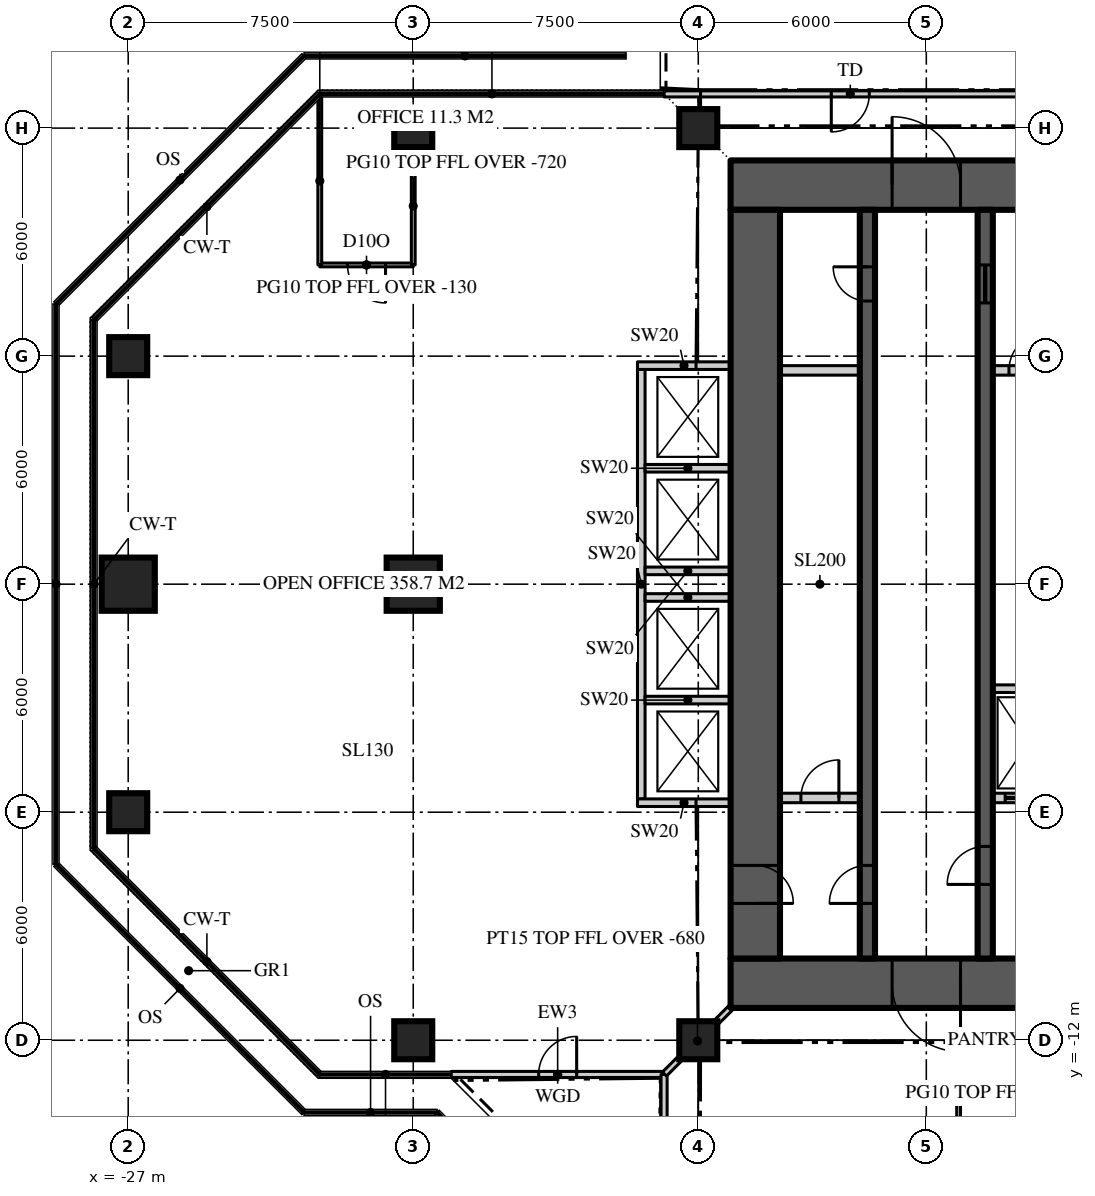
"""IFC4 building model, lengths in metres.
Left out: names, types, materials, properties, quantities, classifications, styles, units other than length and angle.
Written with IfcOpenShell. Run it as: python <this file> out.ifc"""

import sys

from ifc_helpers import new_model, si_unit, direction, frame, frame_2d, origin, origin_2d, place, context, subcontext, project, spatial, rectangle, extrude, element, fill, save


model = new_model("IFC4")
c1 = context("Model", 3, precision=1e-05, world=origin(), true_north=direction((0.0, 1.0)))
c2 = subcontext(c1, "Body", "Model", "MODEL_VIEW")
j1 = project(units=[si_unit("LENGTHUNIT", "METRE"), si_unit("PLANEANGLEUNIT", "RADIAN")], contexts=[c1])
p1 = place(None, origin())
s1 = spatial("IfcSite", under=j1, at=p1, CompositionType="ELEMENT")
p2 = place(p1, origin())
s2 = spatial("IfcBuilding", under=s1, at=p2, CompositionType="ELEMENT")
p3 = place(p2, frame((0.0, 0.0, 267.3)))
s3 = spatial("IfcBuildingStorey", under=s2, at=p3, CompositionType="ELEMENT", Elevation=267.3)
p4 = place(p3, frame((-11.15, 10.5, 0.0), z_axis=(0.0, 0.0, 1.0), x_axis=(1.0, 0.0, 0.0)))
e1 = element("IfcWall", 1, at=p4, inside=s3, PredefinedType="SHEAR", context=c2, shape_type="SweptSolid", body=[
    extrude(rectangle(XDim=22.3, YDim=1.3, at=frame_2d((11.15, 0.0))), origin(), (0.0, 0.0, 1.0), 3.9),
])
p5 = place(p4, frame((4.25, 0.0, 0.0)))
e2 = element("IfcOpeningElement", 2, at=p5, cuts=e1, PredefinedType="OPENING", context=c2, shape_type="SweptSolid", body=[
    extrude(rectangle(XDim=1.8, YDim=2.2, at=frame_2d((0.9, 1.1))), frame((0.0, 0.66, 0.0), z_axis=(0.0, -1.0, 0.0), x_axis=(1.0, 0.0, 0.0)), (0.0, 0.0, 1.0), 1.32),
])
p6 = place(p4, frame((16.25, 0.0, 0.0)))
e3 = element("IfcOpeningElement", 3, at=p6, cuts=e1, PredefinedType="OPENING", context=c2, shape_type="SweptSolid", body=[
    extrude(rectangle(XDim=1.8, YDim=2.2, at=frame_2d((0.9, 1.1))), frame((0.0, 0.66, 0.0), z_axis=(0.0, -1.0, 0.0), x_axis=(1.0, 0.0, 0.0)), (0.0, 0.0, 1.0), 1.32),
])
p7 = place(p3, frame((11.15, -10.5, 0.0), z_axis=(0.0, 0.0, 1.0), x_axis=(-1.0, 0.0, 0.0)))
e4 = element("IfcWall", 4, at=p7, inside=s3, PredefinedType="SHEAR", context=c2, shape_type="SweptSolid", body=[
    extrude(rectangle(XDim=22.3, YDim=1.3, at=frame_2d((11.15, 0.0))), origin(), (0.0, 0.0, 1.0), 3.9),
])
p8 = place(p7, frame((16.25, 0.0, 0.0)))
e5 = element("IfcOpeningElement", 5, at=p8, cuts=e4, PredefinedType="OPENING", context=c2, shape_type="SweptSolid", body=[
    extrude(rectangle(XDim=1.8, YDim=2.2, at=frame_2d((0.9, 1.1))), frame((0.0, 0.66, 0.0), z_axis=(0.0, -1.0, 0.0), x_axis=(1.0, 0.0, 0.0)), (0.0, 0.0, 1.0), 1.32),
])
p9 = place(p7, frame((4.25, 0.0, 0.0)))
e6 = element("IfcOpeningElement", 6, at=p9, cuts=e4, PredefinedType="OPENING", context=c2, shape_type="SweptSolid", body=[
    extrude(rectangle(XDim=1.8, YDim=2.2, at=frame_2d((0.9, 1.1))), frame((0.0, 0.66, 0.0), z_axis=(0.0, -1.0, 0.0), x_axis=(1.0, 0.0, 0.0)), (0.0, 0.0, 1.0), 1.32),
])
p10 = place(p3, frame((-10.5, 9.85, 0.0), z_axis=(0.0, 0.0, 1.0), x_axis=(0.0, -1.0, 0.0)))
e7 = element("IfcWall", 7, at=p10, inside=s3, PredefinedType="SHEAR", context=c2, shape_type="SweptSolid", body=[
    extrude(rectangle(XDim=19.7, YDim=1.3, at=frame_2d((9.85, 0.0))), origin(), (0.0, 0.0, 1.0), 3.9),
])
p11 = place(p10, frame((17.25, 0.0, 0.0)))
e8 = element("IfcOpeningElement", 8, at=p11, cuts=e7, PredefinedType="OPENING", context=c2, shape_type="SweptSolid", body=[
    extrude(rectangle(XDim=1.0, YDim=2.2, at=frame_2d((0.5, 1.1))), frame((0.0, 0.66, 0.0), z_axis=(0.0, -1.0, 0.0), x_axis=(1.0, 0.0, 0.0)), (0.0, 0.0, 1.0), 1.32),
])
for number, where, z_axis, x_axis in (
    (9, (-19.5, -12.0, 0.0), (0.0, 0.0, 1.0), (1.0, 0.0, 0.0)),
    (10, (-12.0, -12.0, 0.0), (0.0, 0.0, 1.0), (1.0, 0.0, 0.0)),
    (11, (-27.0, -6.0, 0.0), (0.0, 0.0, 1.0), (1.0, 0.0, 0.0)),
):
    element("IfcColumn", number, at=place(p3, frame(where, z_axis=z_axis, x_axis=x_axis)), inside=s3, PredefinedType="COLUMN", context=c2, shape_type="SweptSolid", body=[
        extrude(rectangle(XDim=1.0, YDim=1.0, at=origin_2d()), origin(), (0.0, 0.0, 1.0), 3.9),
    ])
for number, where, z_axis, x_axis in (
    (12, (-27.0, 0.0, 0.0), (0.0, 0.0, 1.0), (1.0, 0.0, 0.0)),
    (13, (-19.5, 0.0, 0.0), (0.0, 0.0, 1.0), (1.0, 0.0, 0.0)),
):
    element("IfcColumn", number, at=place(p3, frame(where, z_axis=z_axis, x_axis=x_axis)), inside=s3, PredefinedType="COLUMN", context=c2, shape_type="SweptSolid", body=[
        extrude(rectangle(XDim=1.4, YDim=1.4, at=origin_2d()), origin(), (0.0, 0.0, 1.0), 3.9),
    ])
for number, where, z_axis, x_axis in (
    (14, (-27.0, 6.0, 0.0), (0.0, 0.0, 1.0), (1.0, 0.0, 0.0)),
    (15, (-19.5, 12.0, 0.0), (0.0, 0.0, 1.0), (1.0, 0.0, 0.0)),
    (16, (-12.0, 12.0, 0.0), (0.0, 0.0, 1.0), (1.0, 0.0, 0.0)),
):
    element("IfcColumn", number, at=place(p3, frame(where, z_axis=z_axis, x_axis=x_axis)), inside=s3, PredefinedType="COLUMN", context=c2, shape_type="SweptSolid", body=[
        extrude(rectangle(XDim=1.0, YDim=1.0, at=origin_2d()), origin(), (0.0, 0.0, 1.0), 3.9),
    ])
p12 = place(p3, frame((12.9, 12.9, 0.0), z_axis=(0.0, 0.0, 1.0), x_axis=(-1.0, 0.0, 0.0)))
e17 = element("IfcWall", 17, at=p12, inside=s3, PredefinedType="SOLIDWALL", context=c2, shape_type="SweptSolid", body=[
    extrude(rectangle(XDim=25.8, YDim=0.16, at=frame_2d((12.9, 0.0))), origin(), (0.0, 0.0, 1.0), 3.77),
])
p13 = place(p12, frame((4.4, 0.0, 0.0)))
e18 = element("IfcOpeningElement", 18, at=p13, cuts=e17, PredefinedType="OPENING", context=c2, shape_type="SweptSolid", body=[
    extrude(rectangle(XDim=1.0, YDim=2.2, at=frame_2d((0.5, 1.1))), frame((0.0, 0.09, 0.0), z_axis=(0.0, -1.0, 0.0), x_axis=(1.0, 0.0, 0.0)), (0.0, 0.0, 1.0), 0.18),
])
p14 = place(p12, frame((20.4, 0.0, 0.0)))
e19 = element("IfcOpeningElement", 19, at=p14, cuts=e17, PredefinedType="OPENING", context=c2, shape_type="SweptSolid", body=[
    extrude(rectangle(XDim=1.0, YDim=2.2, at=frame_2d((0.5, 1.1))), frame((0.0, 0.09, 0.0), z_axis=(0.0, -1.0, 0.0), x_axis=(1.0, 0.0, 0.0)), (0.0, 0.0, 1.0), 0.18),
])
p15 = place(p3, frame((-18.5, -12.9, 0.0), z_axis=(0.0, 0.0, 1.0), x_axis=(1.0, 0.0, 0.0)))
e20 = element("IfcWall", 20, at=p15, inside=s3, PredefinedType="SOLIDWALL", context=c2, shape_type="SweptSolid", body=[
    extrude(rectangle(XDim=5.6, YDim=0.16, at=frame_2d((2.8, 0.0))), origin(), (0.0, 0.0, 1.0), 3.77),
])
p16 = place(p15, frame((2.3, 0.0, 0.0)))
e21 = element("IfcOpeningElement", 21, at=p16, cuts=e20, PredefinedType="OPENING", context=c2, shape_type="SweptSolid", body=[
    extrude(rectangle(XDim=1.0, YDim=2.2, at=frame_2d((0.5, 1.1))), frame((0.0, 0.09, 0.0), z_axis=(0.0, -1.0, 0.0), x_axis=(1.0, 0.0, 0.0)), (0.0, 0.0, 1.0), 0.18),
])
p17 = place(p3, frame((-12.9, -12.9, 0.0), z_axis=(0.0, 0.0, 1.0), x_axis=(0.0, -1.0, 0.0)))
e22 = element("IfcWall", 22, at=p17, inside=s3, PredefinedType="SOLIDWALL", context=c2, shape_type="SweptSolid", body=[
    extrude(rectangle(XDim=5.6, YDim=0.16, at=frame_2d((2.8, 0.0))), origin(), (0.0, 0.0, 1.0), 3.77),
])
p18 = place(p3, frame((-7.55, -9.85, 0.0), z_axis=(0.0, 0.0, 1.0), x_axis=(0.0, 1.0, 0.0)))
e23 = element("IfcWall", 23, at=p18, inside=s3, PredefinedType="SHEAR", context=c2, shape_type="SweptSolid", body=[
    extrude(rectangle(XDim=19.7, YDim=0.4, at=frame_2d((9.85, 0.0))), origin(), (0.0, 0.0, 1.0), 3.9),
])
p19 = place(p18, frame((1.45, 0.0, 0.0)))
e24 = element("IfcOpeningElement", 24, at=p19, cuts=e23, PredefinedType="OPENING", context=c2, shape_type="SweptSolid", body=[
    extrude(rectangle(XDim=1.0, YDim=2.2, at=frame_2d((0.5, 1.1))), frame((0.0, 0.21, 0.0), z_axis=(0.0, -1.0, 0.0), x_axis=(1.0, 0.0, 0.0)), (0.0, 0.0, 1.0), 0.42),
])
p20 = place(p18, frame((17.3, 0.0, 0.0)))
e25 = element("IfcOpeningElement", 25, at=p20, cuts=e23, PredefinedType="OPENING", context=c2, shape_type="SweptSolid", body=[
    extrude(rectangle(XDim=0.9, YDim=2.1, at=frame_2d((0.45, 1.05))), frame((0.0, 0.21, 0.0), z_axis=(0.0, -1.0, 0.0), x_axis=(1.0, 0.0, 0.0)), (0.0, 0.0, 1.0), 0.42),
])
p21 = place(p3, frame((-4.45, -9.85, 0.0), z_axis=(0.0, 0.0, 1.0), x_axis=(0.0, 1.0, 0.0)))
e26 = element("IfcWall", 26, at=p21, inside=s3, PredefinedType="SHEAR", context=c2, shape_type="SweptSolid", body=[
    extrude(rectangle(XDim=19.7, YDim=0.4, at=frame_2d((9.85, 0.0))), origin(), (0.0, 0.0, 1.0), 3.9),
])
p22 = place(p21, frame((1.95, 0.0, 0.0)))
e27 = element("IfcOpeningElement", 27, at=p22, cuts=e26, PredefinedType="OPENING", context=c2, shape_type="SweptSolid", body=[
    extrude(rectangle(XDim=1.0, YDim=2.2, at=frame_2d((0.5, 1.1))), frame((0.0, 0.21, 0.0), z_axis=(0.0, -1.0, 0.0), x_axis=(1.0, 0.0, 0.0)), (0.0, 0.0, 1.0), 0.42),
])
p23 = place(p21, frame((17.25, 0.0, 0.0)))
e28 = element("IfcOpeningElement", 28, at=p23, cuts=e26, PredefinedType="OPENING", context=c2, shape_type="SweptSolid", body=[
    extrude(rectangle(XDim=1.0, YDim=2.1, at=frame_2d((0.5, 1.05))), frame((0.0, 0.21, 0.0), z_axis=(0.0, -1.0, 0.0), x_axis=(1.0, 0.0, 0.0)), (0.0, 0.0, 1.0), 0.42),
])
p24 = place(p3, frame((-9.85, 5.625, 0.0), z_axis=(0.0, 0.0, 1.0), x_axis=(1.0, 0.0, 0.0)))
e29 = element("IfcWall", 29, at=p24, inside=s3, PredefinedType="SOLIDWALL", context=c2, shape_type="SweptSolid", body=[
    extrude(rectangle(XDim=2.1, YDim=0.25, at=frame_2d((1.05, 0.0))), origin(), (0.0, 0.0, 1.0), 3.7),
])
p25 = place(p3, frame((-4.25, 5.625, 0.0), z_axis=(0.0, 0.0, 1.0), x_axis=(1.0, 0.0, 0.0)))
e30 = element("IfcWall", 30, at=p25, inside=s3, PredefinedType="SOLIDWALL", context=c2, shape_type="SweptSolid", body=[
    extrude(rectangle(XDim=1.85, YDim=0.25, at=frame_2d((0.925, 0.0))), origin(), (0.0, 0.0, 1.0), 3.7),
])
p26 = place(p25, frame((0.425, 0.0, 0.0)))
e31 = element("IfcOpeningElement", 31, at=p26, cuts=e30, PredefinedType="OPENING", context=c2, shape_type="SweptSolid", body=[
    extrude(rectangle(XDim=1.0, YDim=2.2, at=frame_2d((0.5, 1.1))), frame((0.0, 0.135, 0.0), z_axis=(0.0, -1.0, 0.0), x_axis=(1.0, 0.0, 0.0)), (0.0, 0.0, 1.0), 0.27),
])
p27 = place(p3, frame((-9.85, -5.625, 0.0), z_axis=(0.0, 0.0, 1.0), x_axis=(1.0, 0.0, 0.0)))
e32 = element("IfcWall", 32, at=p27, inside=s3, PredefinedType="SOLIDWALL", context=c2, shape_type="SweptSolid", body=[
    extrude(rectangle(XDim=2.1, YDim=0.25, at=frame_2d((1.05, 0.0))), origin(), (0.0, 0.0, 1.0), 3.7),
])
p28 = place(p27, frame((0.55, 0.0, 0.0)))
e33 = element("IfcOpeningElement", 33, at=p28, cuts=e32, PredefinedType="OPENING", context=c2, shape_type="SweptSolid", body=[
    extrude(rectangle(XDim=1.0, YDim=2.2, at=frame_2d((0.5, 1.1))), frame((0.0, 0.135, 0.0), z_axis=(0.0, -1.0, 0.0), x_axis=(1.0, 0.0, 0.0)), (0.0, 0.0, 1.0), 0.27),
])
p29 = place(p3, frame((-4.25, -5.625, 0.0), z_axis=(0.0, 0.0, 1.0), x_axis=(1.0, 0.0, 0.0)))
e34 = element("IfcWall", 34, at=p29, inside=s3, PredefinedType="SOLIDWALL", context=c2, shape_type="SweptSolid", body=[
    extrude(rectangle(XDim=1.85, YDim=0.25, at=frame_2d((0.925, 0.0))), origin(), (0.0, 0.0, 1.0), 3.7),
])
p30 = place(p29, frame((0.325, 0.0, 0.0)))
e35 = element("IfcOpeningElement", 35, at=p30, cuts=e34, PredefinedType="OPENING", context=c2, shape_type="SweptSolid", body=[
    extrude(rectangle(XDim=1.2, YDim=2.2, at=frame_2d((0.6, 1.1))), frame((0.0, 0.135, 0.0), z_axis=(0.0, -1.0, 0.0), x_axis=(1.0, 0.0, 0.0)), (0.0, 0.0, 1.0), 0.27),
])
p31 = place(p3, frame((-4.25, -2.75, 0.0), z_axis=(0.0, 0.0, 1.0), x_axis=(1.0, 0.0, 0.0)))
e36 = element("IfcWall", 36, at=p31, inside=s3, PredefinedType="SOLIDWALL", context=c2, shape_type="SweptSolid", body=[
    extrude(rectangle(XDim=1.85, YDim=0.2, at=frame_2d((0.925, 0.0))), origin(), (0.0, 0.0, 1.0), 3.7),
])
p32 = place(p3, frame((-19.5, 8.4, 0.0), z_axis=(0.0, 0.0, 1.0), x_axis=(-1.0, 0.0, 0.0)))
e37 = element("IfcWall", 37, at=p32, inside=s3, PredefinedType="PARTITIONING", context=c2, shape_type="SweptSolid", body=[
    extrude(rectangle(XDim=2.459, YDim=0.1, at=frame_2d((1.229, 0.0))), origin(), (0.0, 0.0, 1.0), 3.77),
])
p33 = place(p32, frame((0.729, 0.0, 0.0)))
e38 = element("IfcOpeningElement", 38, at=p33, cuts=e37, PredefinedType="OPENING", context=c2, shape_type="SweptSolid", body=[
    extrude(rectangle(XDim=1.0, YDim=2.2, at=frame_2d((0.5, 1.1))), frame((0.0, 0.06, 0.0), z_axis=(0.0, -1.0, 0.0), x_axis=(1.0, 0.0, 0.0)), (0.0, 0.0, 1.0), 0.12),
])
p34 = place(p3, frame((-19.5, 8.4, 0.0), z_axis=(0.0, 0.0, 1.0), x_axis=(0.0, 1.0, 0.0)))
e39 = element("IfcWall", 39, at=p34, inside=s3, PredefinedType="PARTITIONING", context=c2, shape_type="SweptSolid", body=[
    extrude(rectangle(XDim=3.1, YDim=0.1, at=frame_2d((1.55, 0.0))), origin(), (0.0, 0.0, 1.0), 3.18),
])
p35 = place(p3, frame((-21.959, 8.4, 0.0), z_axis=(0.0, 0.0, 1.0), x_axis=(0.0, 1.0, 0.0)))
e40 = element("IfcWall", 40, at=p35, inside=s3, PredefinedType="PARTITIONING", context=c2, shape_type="SweptSolid", body=[
    extrude(rectangle(XDim=4.42, YDim=0.1, at=frame_2d((2.21, 0.0))), origin(), (0.0, 0.0, 1.0), 3.77),
])
p36 = place(p3, frame((-2.15, -13.4, 0.0), z_axis=(0.0, 0.0, 1.0), x_axis=(-1.0, 0.0, 0.0)))
e41 = element("IfcWall", 41, at=p36, inside=s3, PredefinedType="PARTITIONING", context=c2, shape_type="SweptSolid", body=[
    extrude(rectangle(XDim=3.0, YDim=0.1, at=frame_2d((1.5, 0.0))), origin(), (0.0, 0.0, 1.0), 3.77),
])
p37 = place(p3, frame((-5.15, -13.35, 0.0), z_axis=(0.0, 0.0, 1.0), x_axis=(0.0, -1.0, 0.0)))
e42 = element("IfcWall", 42, at=p37, inside=s3, PredefinedType="PARTITIONING", context=c2, shape_type="SweptSolid", body=[
    extrude(rectangle(XDim=3.1, YDim=0.1, at=frame_2d((1.55, 0.0))), origin(), (0.0, 0.0, 1.0), 3.77),
])
p38 = place(p37, frame((1.05, 0.0, 0.0)))
e43 = element("IfcOpeningElement", 43, at=p38, cuts=e42, PredefinedType="OPENING", context=c2, shape_type="SweptSolid", body=[
    extrude(rectangle(XDim=1.0, YDim=2.2, at=frame_2d((0.5, 1.1))), frame((0.0, 0.06, 0.0), z_axis=(0.0, -1.0, 0.0), x_axis=(1.0, 0.0, 0.0)), (0.0, 0.0, 1.0), 0.12),
])
p39 = place(p3, frame((-13.5, 5.65, 0.0), z_axis=(0.0, 0.0, 1.0), x_axis=(0.0, -1.0, 0.0)))
e44 = element("IfcWall", 44, at=p39, inside=s3, PredefinedType="SOLIDWALL", context=c2, shape_type="SweptSolid", body=[
    extrude(rectangle(XDim=11.3, YDim=0.2, at=frame_2d((5.65, 0.0))), origin(), (0.0, 0.0, 1.0), 3.7),
])
for number, where, z_axis, x_axis in (
    (45, (-11.15, 5.75, 0.0), (0.0, 0.0, 1.0), (-1.0, 0.0, 0.0)),
    (46, (-11.15, -5.75, 0.0), (0.0, 0.0, 1.0), (-1.0, 0.0, 0.0)),
):
    element("IfcWall", number, at=place(p3, frame(where, z_axis=z_axis, x_axis=x_axis)), inside=s3, PredefinedType="SOLIDWALL", context=c2, shape_type="SweptSolid", body=[
        extrude(rectangle(XDim=2.45, YDim=0.2, at=frame_2d((1.225, 0.0))), origin(), (0.0, 0.0, 1.0), 3.7),
    ])
for number, where, z_axis, x_axis in (
    (47, (-11.15, 3.05, 0.0), (0.0, 0.0, 1.0), (-1.0, 0.0, 0.0)),
    (48, (-11.15, 0.35, 0.0), (0.0, 0.0, 1.0), (-1.0, 0.0, 0.0)),
    (49, (-11.15, -0.35, 0.0), (0.0, 0.0, 1.0), (-1.0, 0.0, 0.0)),
    (50, (-11.15, -3.05, 0.0), (0.0, 0.0, 1.0), (-1.0, 0.0, 0.0)),
):
    element("IfcWall", number, at=place(p3, frame(where, z_axis=z_axis, x_axis=x_axis)), inside=s3, PredefinedType="SOLIDWALL", context=c2, shape_type="SweptSolid", body=[
        extrude(rectangle(XDim=2.25, YDim=0.2, at=frame_2d((1.125, 0.0))), origin(), (0.0, 0.0, 1.0), 3.7),
    ])
p40 = place(p3, frame((-11.15, -11.15, 0.0), z_axis=(0.0, 0.0, 1.0), x_axis=(-0.707106781187, -0.707106781187, 0.0)))
e51 = element("IfcWall", 51, at=p40, inside=s3, PredefinedType="PARTITIONING", context=c2, shape_type="SweptSolid", body=[
    extrude(rectangle(XDim=2.461, YDim=0.15, at=frame_2d((1.23, 0.0))), origin(), (0.0, 0.0, 1.0), 3.22),
])
p41 = place(p14, origin())
e52 = element("IfcDoor", 52, at=p41, inside=s3, OperationType="SINGLE_SWING_RIGHT", PredefinedType="DOOR", context=c2, shape_type="SweptSolid", body=[
    extrude(rectangle(XDim=1.0, YDim=2.2, at=frame_2d((0.5, 1.1))), frame((0.0, 0.025, 0.0), z_axis=(0.0, -1.0, 0.0), x_axis=(1.0, 0.0, 0.0)), (0.0, 0.0, 1.0), 0.05),
])
fill(e19, e52)
p42 = place(p16, origin())
e53 = element("IfcDoor", 53, at=p42, inside=s3, OperationType="SINGLE_SWING_RIGHT", PredefinedType="DOOR", context=c2, shape_type="SweptSolid", body=[
    extrude(rectangle(XDim=1.0, YDim=2.2, at=frame_2d((0.5, 1.1))), frame((0.0, 0.025, 0.0), z_axis=(0.0, -1.0, 0.0), x_axis=(1.0, 0.0, 0.0)), (0.0, 0.0, 1.0), 0.05),
])
fill(e21, e53)
p43 = place(p5, origin())
e54 = element("IfcDoor", 54, at=p43, inside=s3, OperationType="DOUBLE_DOOR_DOUBLE_SWING", PredefinedType="DOOR", context=c2, shape_type="SweptSolid", body=[
    extrude(rectangle(XDim=1.8, YDim=2.2, at=frame_2d((0.9, 1.1))), frame((0.0, 0.025, 0.0), z_axis=(0.0, -1.0, 0.0), x_axis=(1.0, 0.0, 0.0)), (0.0, 0.0, 1.0), 0.05),
])
fill(e2, e54)
p44 = place(p8, origin())
e55 = element("IfcDoor", 55, at=p44, inside=s3, OperationType="DOUBLE_DOOR_DOUBLE_SWING", PredefinedType="DOOR", context=c2, shape_type="SweptSolid", body=[
    extrude(rectangle(XDim=1.8, YDim=2.2, at=frame_2d((0.9, 1.1))), frame((0.0, 0.025, 0.0), z_axis=(0.0, -1.0, 0.0), x_axis=(1.0, 0.0, 0.0)), (0.0, 0.0, 1.0), 0.05),
])
fill(e5, e55)
p45 = place(p19, origin())
e56 = element("IfcDoor", 56, at=p45, inside=s3, OperationType="SINGLE_SWING_LEFT", PredefinedType="DOOR", context=c2, shape_type="SweptSolid", body=[
    extrude(rectangle(XDim=1.0, YDim=2.2, at=frame_2d((0.5, 1.1))), frame((0.0, 0.025, 0.0), z_axis=(0.0, -1.0, 0.0), x_axis=(1.0, 0.0, 0.0)), (0.0, 0.0, 1.0), 0.05),
])
fill(e24, e56)
p46 = place(p11, origin())
e57 = element("IfcDoor", 57, at=p46, inside=s3, OperationType="SINGLE_SWING_RIGHT", PredefinedType="DOOR", context=c2, shape_type="SweptSolid", body=[
    extrude(rectangle(XDim=1.0, YDim=2.2, at=frame_2d((0.5, 1.1))), frame((0.0, 0.025, 0.0), z_axis=(0.0, -1.0, 0.0), x_axis=(1.0, 0.0, 0.0)), (0.0, 0.0, 1.0), 0.05),
])
fill(e8, e57)
p47 = place(p22, origin())
e58 = element("IfcDoor", 58, at=p47, inside=s3, OperationType="SINGLE_SWING_LEFT", PredefinedType="DOOR", context=c2, shape_type="SweptSolid", body=[
    extrude(rectangle(XDim=1.0, YDim=2.2, at=frame_2d((0.5, 1.1))), frame((0.0, 0.025, 0.0), z_axis=(0.0, -1.0, 0.0), x_axis=(1.0, 0.0, 0.0)), (0.0, 0.0, 1.0), 0.05),
])
fill(e27, e58)
p48 = place(p20, origin())
e59 = element("IfcDoor", 59, at=p48, inside=s3, OperationType="SINGLE_SWING_RIGHT", PredefinedType="DOOR", context=c2, shape_type="SweptSolid", body=[
    extrude(rectangle(XDim=0.9, YDim=2.1, at=frame_2d((0.45, 1.05))), frame((0.0, 0.025, 0.0), z_axis=(0.0, -1.0, 0.0), x_axis=(1.0, 0.0, 0.0)), (0.0, 0.0, 1.0), 0.05),
])
fill(e25, e59)
p49 = place(p23, origin())
e60 = element("IfcDoor", 60, at=p49, inside=s3, OperationType="SLIDING_TO_LEFT", PredefinedType="DOOR", context=c2, shape_type="SweptSolid", body=[
    extrude(rectangle(XDim=1.0, YDim=2.1, at=frame_2d((0.5, 1.05))), frame((0.0, 0.025, 0.0), z_axis=(0.0, -1.0, 0.0), x_axis=(1.0, 0.0, 0.0)), (0.0, 0.0, 1.0), 0.05),
])
fill(e28, e60)
p50 = place(p30, origin())
e61 = element("IfcDoor", 61, at=p50, inside=s3, OperationType="SLIDING_TO_LEFT", PredefinedType="DOOR", context=c2, shape_type="SweptSolid", body=[
    extrude(rectangle(XDim=1.2, YDim=2.2, at=frame_2d((0.6, 1.1))), frame((0.0, 0.025, 0.0), z_axis=(0.0, -1.0, 0.0), x_axis=(1.0, 0.0, 0.0)), (0.0, 0.0, 1.0), 0.05),
])
fill(e35, e61)
p51 = place(p33, origin())
e62 = element("IfcDoor", 62, at=p51, inside=s3, OperationType="SINGLE_SWING_LEFT", PredefinedType="DOOR", context=c2, shape_type="SweptSolid", body=[
    extrude(rectangle(XDim=1.0, YDim=2.2, at=frame_2d((0.5, 1.1))), frame((0.0, 0.025, 0.0), z_axis=(0.0, -1.0, 0.0), x_axis=(1.0, 0.0, 0.0)), (0.0, 0.0, 1.0), 0.05),
])
fill(e38, e62)
p52 = place(p28, origin())
e63 = element("IfcDoor", 63, at=p52, inside=s3, OperationType="SINGLE_SWING_RIGHT", PredefinedType="DOOR", context=c2, shape_type="SweptSolid", body=[
    extrude(rectangle(XDim=1.0, YDim=2.2, at=frame_2d((0.5, 1.1))), frame((0.0, 0.025, 0.0), z_axis=(0.0, -1.0, 0.0), x_axis=(1.0, 0.0, 0.0)), (0.0, 0.0, 1.0), 0.05),
])
fill(e33, e63)
p53 = place(p26, origin())
e64 = element("IfcDoor", 64, at=p53, inside=s3, OperationType="SINGLE_SWING_RIGHT", PredefinedType="DOOR", context=c2, shape_type="SweptSolid", body=[
    extrude(rectangle(XDim=1.0, YDim=2.2, at=frame_2d((0.5, 1.1))), frame((0.0, 0.025, 0.0), z_axis=(0.0, -1.0, 0.0), x_axis=(1.0, 0.0, 0.0)), (0.0, 0.0, 1.0), 0.05),
])
fill(e31, e64)
save(model, sys.argv[1])
